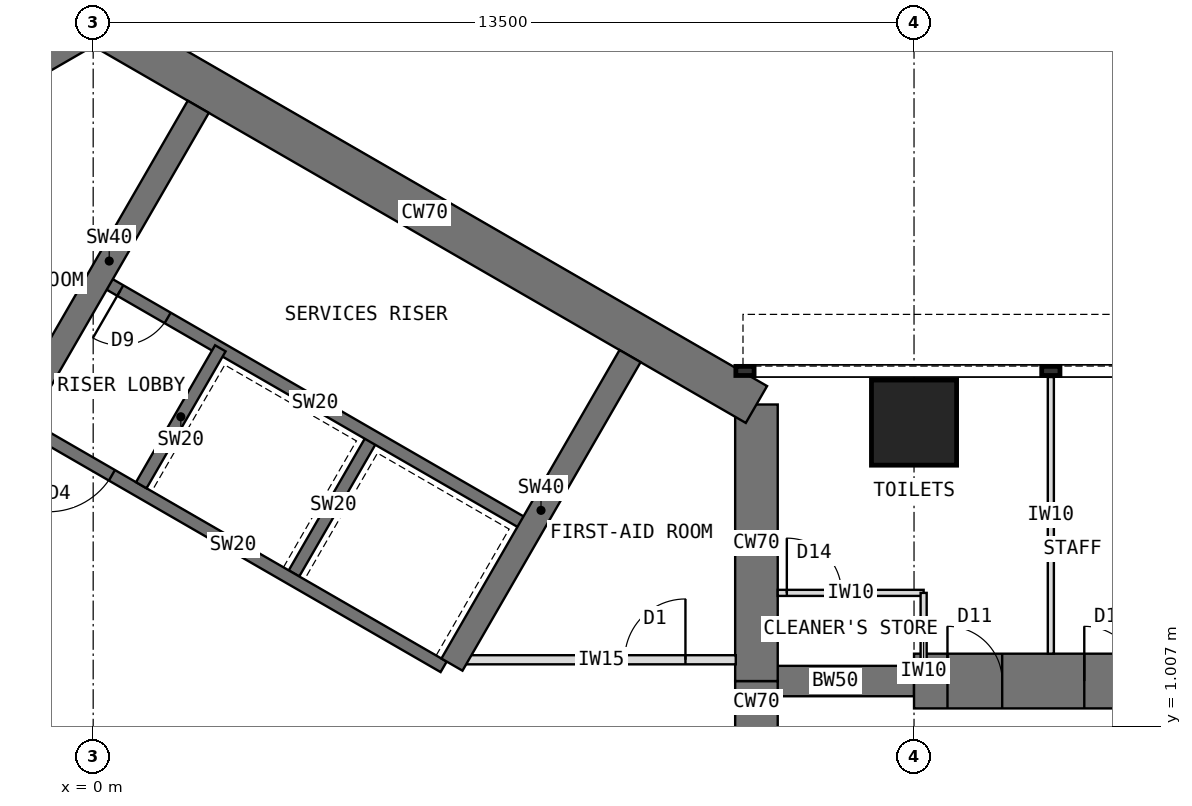
"""IFC4 building model, lengths in metres.
Left out: names, types, materials, properties, quantities, classifications, styles, units other than length and angle.
Written with IfcOpenShell. Run it as: python <this file> out.ifc"""

import sys

from ifc_helpers import new_model, si_unit, direction, frame, frame_2d, origin, origin_2d, place, context, subcontext, project, spatial, rectangle, extrude, element, fill, save


model = new_model("IFC4")
c1 = context("Model", 3, precision=1e-05, world=origin(), true_north=direction((0.0, 1.0)))
c2 = subcontext(c1, "Body", "Model", "MODEL_VIEW")
j1 = project(units=[si_unit("LENGTHUNIT", "METRE"), si_unit("PLANEANGLEUNIT", "RADIAN")], contexts=[c1])
p1 = place(None, origin())
s1 = spatial("IfcSite", under=j1, at=p1, CompositionType="ELEMENT")
p2 = place(p1, origin())
s2 = spatial("IfcBuilding", under=s1, at=p2, CompositionType="ELEMENT")
p3 = place(p2, frame((0.0, 0.0, 88.5)))
s3 = spatial("IfcBuildingStorey", under=s2, at=p3, CompositionType="ELEMENT", Elevation=88.5)
p4 = place(p3, frame((10.908, -1.75, 0.0), z_axis=(0.0, 0.0, 1.0), x_axis=(0.0, 1.0, 0.0)))
e1 = element("IfcWall", 1, at=p4, inside=s3, PredefinedType="SHEAR", context=c2, shape_type="SweptSolid", body=[
    extrude(rectangle(XDim=3.5, YDim=0.7, at=frame_2d((1.75, 0.0))), origin(), (0.0, 0.0, 1.0), 4.0),
])
p5 = place(p4, frame((0.85, 0.0, 0.0)))
e2 = element("IfcOpeningElement", 2, at=p5, cuts=e1, PredefinedType="OPENING", context=c2, shape_type="SweptSolid", body=[
    extrude(rectangle(XDim=1.8, YDim=2.1, at=frame_2d((0.9, 1.05))), frame((0.0, 0.36, 0.0), z_axis=(0.0, -1.0, 0.0), x_axis=(1.0, 0.0, 0.0)), (0.0, 0.0, 1.0), 0.72),
])
p6 = place(p3, frame((10.908, 1.75, 0.0), z_axis=(0.0, 0.0, 1.0), x_axis=(0.0, 1.0, 0.0)))
e3 = element("IfcWall", 3, at=p6, inside=s3, PredefinedType="SHEAR", context=c2, shape_type="SweptSolid", body=[
    extrude(rectangle(XDim=4.548, YDim=0.7, at=frame_2d((2.274, 0.0))), origin(), (0.0, 0.0, 1.0), 4.0),
])
p7 = place(p3, frame((10.908, 6.298, 0.0), z_axis=(0.0, 0.0, 1.0), x_axis=(-0.866021940709, 0.500005998175, 0.0)))
e4 = element("IfcWall", 4, at=p7, inside=s3, PredefinedType="SHEAR", context=c2, shape_type="SweptSolid", body=[
    extrude(rectangle(XDim=12.596, YDim=0.7, at=frame_2d((6.298, 0.0))), origin(), (0.0, 0.0, 1.0), 4.0),
])
p8 = place(p3, frame((0.0, 12.596, 0.0), z_axis=(0.0, 0.0, 1.0), x_axis=(-0.866011268655, -0.500024481964, 0.0)))
e5 = element("IfcWall", 5, at=p8, inside=s3, PredefinedType="SHEAR", context=c2, shape_type="SweptSolid", body=[
    extrude(rectangle(XDim=4.548, YDim=0.7, at=frame_2d((2.274, 0.0))), origin(), (0.0, 0.0, 1.0), 4.0),
])
p9 = place(p3, frame((10.908, 1.75, 0.0), z_axis=(0.0, 0.0, 1.0), x_axis=(1.0, 0.0, 0.0)))
e6 = element("IfcWall", 6, at=p9, inside=s3, PredefinedType="SHEAR", context=c2, shape_type="SweptSolid", body=[
    extrude(rectangle(XDim=2.592, YDim=0.5, at=frame_2d((1.296, 0.0))), origin(), (0.0, 0.0, 1.0), 4.0),
])
p10 = place(p3, frame((13.5, 1.75, 0.0), z_axis=(0.0, 0.0, 1.0), x_axis=(1.0, 0.0, 0.0)))
e7 = element("IfcWall", 7, at=p10, inside=s3, PredefinedType="SHEAR", context=c2, shape_type="SweptSolid", body=[
    extrude(rectangle(XDim=13.2, YDim=0.9, at=frame_2d((6.6, 0.0))), origin(), (0.0, 0.0, 1.0), 4.0),
])
p11 = place(p10, frame((0.55, 0.0, 0.0)))
e8 = element("IfcOpeningElement", 8, at=p11, cuts=e7, PredefinedType="OPENING", context=c2, shape_type="SweptSolid", body=[
    extrude(rectangle(XDim=0.9, YDim=2.1, at=frame_2d((0.45, 1.05))), frame((0.0, 0.46, 0.0), z_axis=(0.0, -1.0, 0.0), x_axis=(1.0, 0.0, 0.0)), (0.0, 0.0, 1.0), 0.92),
])
p12 = place(p10, frame((2.8, 0.0, 0.0)))
e9 = element("IfcOpeningElement", 9, at=p12, cuts=e7, PredefinedType="OPENING", context=c2, shape_type="SweptSolid", body=[
    extrude(rectangle(XDim=0.9, YDim=2.1, at=frame_2d((0.45, 1.05))), frame((0.0, 0.46, 0.0), z_axis=(0.0, -1.0, 0.0), x_axis=(1.0, 0.0, 0.0)), (0.0, 0.0, 1.0), 0.92),
])
p13 = place(p10, frame((7.3, 0.0, 0.0)))
e10 = element("IfcOpeningElement", 10, at=p13, cuts=e7, PredefinedType="OPENING", context=c2, shape_type="SweptSolid", body=[
    extrude(rectangle(XDim=0.9, YDim=2.1, at=frame_2d((0.45, 1.05))), frame((0.0, 0.46, 0.0), z_axis=(0.0, -1.0, 0.0), x_axis=(1.0, 0.0, 0.0)), (0.0, 0.0, 1.0), 0.92),
])
p14 = place(p3, frame((13.5, 6.0, 0.0), z_axis=(0.0, 0.0, 1.0), x_axis=(1.0, 0.0, 0.0)))
e11 = element("IfcColumn", 11, at=p14, inside=s3, PredefinedType="COLUMN", context=c2, shape_type="SweptSolid", body=[
    extrude(rectangle(XDim=1.4, YDim=1.4, at=origin_2d()), origin(), (0.0, 0.0, 1.0), 4.0),
])
p15 = place(p3, frame((5.764, 1.984, 0.0), z_axis=(0.0, 0.0, 1.0), x_axis=(-0.866026010844, 0.49999894854, 0.0)))
e12 = element("IfcWall", 12, at=p15, inside=s3, PredefinedType="SHEAR", context=c2, shape_type="SweptSolid", body=[
    extrude(rectangle(XDim=8.0, YDim=0.2, at=frame_2d((4.0, 0.0))), origin(), (0.0, 0.0, 1.0), 4.0),
])
p16 = place(p15, frame((6.3, 0.0, 0.0)))
e13 = element("IfcOpeningElement", 13, at=p16, cuts=e12, PredefinedType="OPENING", context=c2, shape_type="SweptSolid", body=[
    extrude(rectangle(XDim=1.2, YDim=2.1, at=frame_2d((0.6, 1.05))), frame((0.0, 0.11, 0.0), z_axis=(0.0, -1.0, 0.0), x_axis=(1.0, 0.0, 0.0)), (0.0, 0.0, 1.0), 0.22),
])
for number, where, z_axis, x_axis in (
    (14, (3.303, 3.52, 0.0), (0.0, 0.0, 1.0), (0.5, 0.866, 0.0)),
    (15, (0.791, 4.97, 0.0), (0.0, 0.0, 1.0), (0.5, 0.866, 0.0)),
):
    element("IfcWall", number, at=place(p3, frame(where, z_axis=z_axis, x_axis=x_axis)), inside=s3, PredefinedType="SHEAR", context=c2, shape_type="SweptSolid", body=[
        extrude(rectangle(XDim=2.6, YDim=0.2, at=frame_2d((1.3, 0.0))), origin(), (0.0, 0.0, 1.0), 4.0),
    ])
p17 = place(p3, frame((7.114, 4.322, 0.0), z_axis=(0.0, 0.0, 1.0), x_axis=(-0.866026010844, 0.49999894854, 0.0)))
e16 = element("IfcWall", 16, at=p17, inside=s3, PredefinedType="SHEAR", context=c2, shape_type="SweptSolid", body=[
    extrude(rectangle(XDim=8.0, YDim=0.2, at=frame_2d((4.0, 0.0))), origin(), (0.0, 0.0, 1.0), 4.0),
])
p18 = place(p17, frame((6.8, 0.0, 0.0)))
e17 = element("IfcOpeningElement", 17, at=p18, cuts=e16, PredefinedType="OPENING", context=c2, shape_type="SweptSolid", body=[
    extrude(rectangle(XDim=0.9, YDim=2.1, at=frame_2d((0.45, 1.05))), frame((0.0, 0.11, 0.0), z_axis=(0.0, -1.0, 0.0), x_axis=(1.0, 0.0, 0.0)), (0.0, 0.0, 1.0), 0.22),
])
for number, where, z_axis, x_axis in (
    (18, (-1.201, 6.12, 0.0), (0.0, 0.0, 1.0), (0.5, 0.866, 0.0)),
    (19, (5.901, 2.02, 0.0), (0.0, 0.0, 1.0), (0.5, 0.866, 0.0)),
):
    element("IfcWall", number, at=place(p3, frame(where, z_axis=z_axis, x_axis=x_axis)), inside=s3, PredefinedType="SHEAR", context=c2, shape_type="SweptSolid", body=[
        extrude(rectangle(XDim=5.858, YDim=0.4, at=frame_2d((2.929, 0.0))), origin(), (0.0, 0.0, 1.0), 4.0),
    ])
p19 = place(p3, frame((15.75, 2.2, 0.0), z_axis=(0.0, 0.0, 1.0), x_axis=(0.0, 1.0, 0.0)))
e20 = element("IfcWall", 20, at=p19, inside=s3, PredefinedType="PARTITIONING", context=c2, shape_type="SweptSolid", body=[
    extrude(rectangle(XDim=4.55, YDim=0.1, at=frame_2d((2.275, 0.0))), origin(), (0.0, 0.0, 1.0), 3.7),
])
p20 = place(p3, frame((11.258, 3.2, 0.0), z_axis=(0.0, 0.0, 1.0), x_axis=(1.0, 0.0, 0.0)))
e21 = element("IfcWall", 21, at=p20, inside=s3, PredefinedType="PARTITIONING", context=c2, shape_type="SweptSolid", body=[
    extrude(rectangle(XDim=2.4, YDim=0.1, at=frame_2d((1.2, 0.0))), origin(), (0.0, 0.0, 1.0), 3.7),
])
p21 = place(p20, frame((0.15, 0.0, 0.0)))
e22 = element("IfcOpeningElement", 22, at=p21, cuts=e21, PredefinedType="OPENING", context=c2, shape_type="SweptSolid", body=[
    extrude(rectangle(XDim=0.9, YDim=2.1, at=frame_2d((0.45, 1.05))), frame((0.0, 0.06, 0.0), z_axis=(0.0, -1.0, 0.0), x_axis=(1.0, 0.0, 0.0)), (0.0, 0.0, 1.0), 0.12),
])
p22 = place(p3, frame((13.658, 2.0, 0.0), z_axis=(0.0, 0.0, 1.0), x_axis=(0.0, 1.0, 0.0)))
e23 = element("IfcWall", 23, at=p22, inside=s3, PredefinedType="PARTITIONING", context=c2, shape_type="SweptSolid", body=[
    extrude(rectangle(XDim=1.2, YDim=0.1, at=frame_2d((0.6, 0.0))), origin(), (0.0, 0.0, 1.0), 3.7),
])
p23 = place(p3, frame((6.143, 2.1, 0.0), z_axis=(0.0, 0.0, 1.0), x_axis=(1.0, 0.0, 0.0)))
e24 = element("IfcWall", 24, at=p23, inside=s3, PredefinedType="PARTITIONING", context=c2, shape_type="SweptSolid", body=[
    extrude(rectangle(XDim=4.426, YDim=0.15, at=frame_2d((2.213, 0.0))), origin(), (0.0, 0.0, 1.0), 3.7),
])
p24 = place(p23, frame((2.598, 0.0, 0.0)))
e25 = element("IfcOpeningElement", 25, at=p24, cuts=e24, PredefinedType="OPENING", context=c2, shape_type="SweptSolid", body=[
    extrude(rectangle(XDim=1.0, YDim=2.1, at=frame_2d((0.5, 1.05))), frame((0.0, 0.085, 0.0), z_axis=(0.0, -1.0, 0.0), x_axis=(1.0, 0.0, 0.0)), (0.0, 0.0, 1.0), 0.17),
])
p25 = place(p16, origin())
e26 = element("IfcDoor", 26, at=p25, inside=s3, OperationType="SINGLE_SWING_RIGHT", PredefinedType="DOOR", context=c2, shape_type="SweptSolid", body=[
    extrude(rectangle(XDim=1.2, YDim=2.1, at=frame_2d((0.6, 1.05))), frame((0.0, 0.025, 0.0), z_axis=(0.0, -1.0, 0.0), x_axis=(1.0, 0.0, 0.0)), (0.0, 0.0, 1.0), 0.05),
])
fill(e13, e26)
p26 = place(p18, origin())
e27 = element("IfcDoor", 27, at=p26, inside=s3, OperationType="SINGLE_SWING_RIGHT", PredefinedType="DOOR", context=c2, shape_type="SweptSolid", body=[
    extrude(rectangle(XDim=0.9, YDim=2.1, at=frame_2d((0.45, 1.05))), frame((0.0, 0.025, 0.0), z_axis=(0.0, -1.0, 0.0), x_axis=(1.0, 0.0, 0.0)), (0.0, 0.0, 1.0), 0.05),
])
fill(e17, e27)
p27 = place(p21, origin())
e28 = element("IfcDoor", 28, at=p27, inside=s3, OperationType="SINGLE_SWING_LEFT", PredefinedType="DOOR", context=c2, shape_type="SweptSolid", body=[
    extrude(rectangle(XDim=0.9, YDim=2.1, at=frame_2d((0.45, 1.05))), frame((0.0, 0.025, 0.0), z_axis=(0.0, -1.0, 0.0), x_axis=(1.0, 0.0, 0.0)), (0.0, 0.0, 1.0), 0.05),
])
fill(e22, e28)
p28 = place(p24, origin())
e29 = element("IfcDoor", 29, at=p28, inside=s3, OperationType="SINGLE_SWING_RIGHT", PredefinedType="DOOR", context=c2, shape_type="SweptSolid", body=[
    extrude(rectangle(XDim=1.0, YDim=2.1, at=frame_2d((0.5, 1.05))), frame((0.0, 0.025, 0.0), z_axis=(0.0, -1.0, 0.0), x_axis=(1.0, 0.0, 0.0)), (0.0, 0.0, 1.0), 0.05),
])
fill(e25, e29)
p29 = place(p11, origin())
e30 = element("IfcDoor", 30, at=p29, inside=s3, OperationType="SINGLE_SWING_LEFT", PredefinedType="DOOR", context=c2, shape_type="SweptSolid", body=[
    extrude(rectangle(XDim=0.82, YDim=2.06, at=frame_2d((0.45, 1.03))), frame((0.0, 0.025, 0.0), z_axis=(0.0, -1.0, 0.0), x_axis=(1.0, 0.0, 0.0)), (0.0, 0.0, 1.0), 0.05),
    extrude(rectangle(XDim=0.04, YDim=2.1, at=frame_2d((0.02, 1.05))), frame((0.0, 0.45, 0.0), z_axis=(0.0, -1.0, 0.0), x_axis=(1.0, 0.0, 0.0)), (0.0, 0.0, 1.0), 0.899),
    extrude(rectangle(XDim=0.04, YDim=2.1, at=frame_2d((0.88, 1.05))), frame((0.0, 0.45, 0.0), z_axis=(0.0, -1.0, 0.0), x_axis=(1.0, 0.0, 0.0)), (0.0, 0.0, 1.0), 0.899),
    extrude(rectangle(XDim=0.82, YDim=0.04, at=frame_2d((0.45, 2.08))), frame((0.0, 0.45, 0.0), z_axis=(0.0, -1.0, 0.0), x_axis=(1.0, 0.0, 0.0)), (0.0, 0.0, 1.0), 0.899),
])
fill(e8, e30)
p30 = place(p12, origin())
e31 = element("IfcDoor", 31, at=p30, inside=s3, OperationType="SINGLE_SWING_LEFT", PredefinedType="DOOR", context=c2, shape_type="SweptSolid", body=[
    extrude(rectangle(XDim=0.82, YDim=2.06, at=frame_2d((0.45, 1.03))), frame((0.0, 0.025, 0.0), z_axis=(0.0, -1.0, 0.0), x_axis=(1.0, 0.0, 0.0)), (0.0, 0.0, 1.0), 0.05),
    extrude(rectangle(XDim=0.04, YDim=2.1, at=frame_2d((0.02, 1.05))), frame((0.0, 0.45, 0.0), z_axis=(0.0, -1.0, 0.0), x_axis=(1.0, 0.0, 0.0)), (0.0, 0.0, 1.0), 0.899),
    extrude(rectangle(XDim=0.04, YDim=2.1, at=frame_2d((0.88, 1.05))), frame((0.0, 0.45, 0.0), z_axis=(0.0, -1.0, 0.0), x_axis=(1.0, 0.0, 0.0)), (0.0, 0.0, 1.0), 0.899),
    extrude(rectangle(XDim=0.82, YDim=0.04, at=frame_2d((0.45, 2.08))), frame((0.0, 0.45, 0.0), z_axis=(0.0, -1.0, 0.0), x_axis=(1.0, 0.0, 0.0)), (0.0, 0.0, 1.0), 0.899),
])
fill(e9, e31)
save(model, sys.argv[1])
